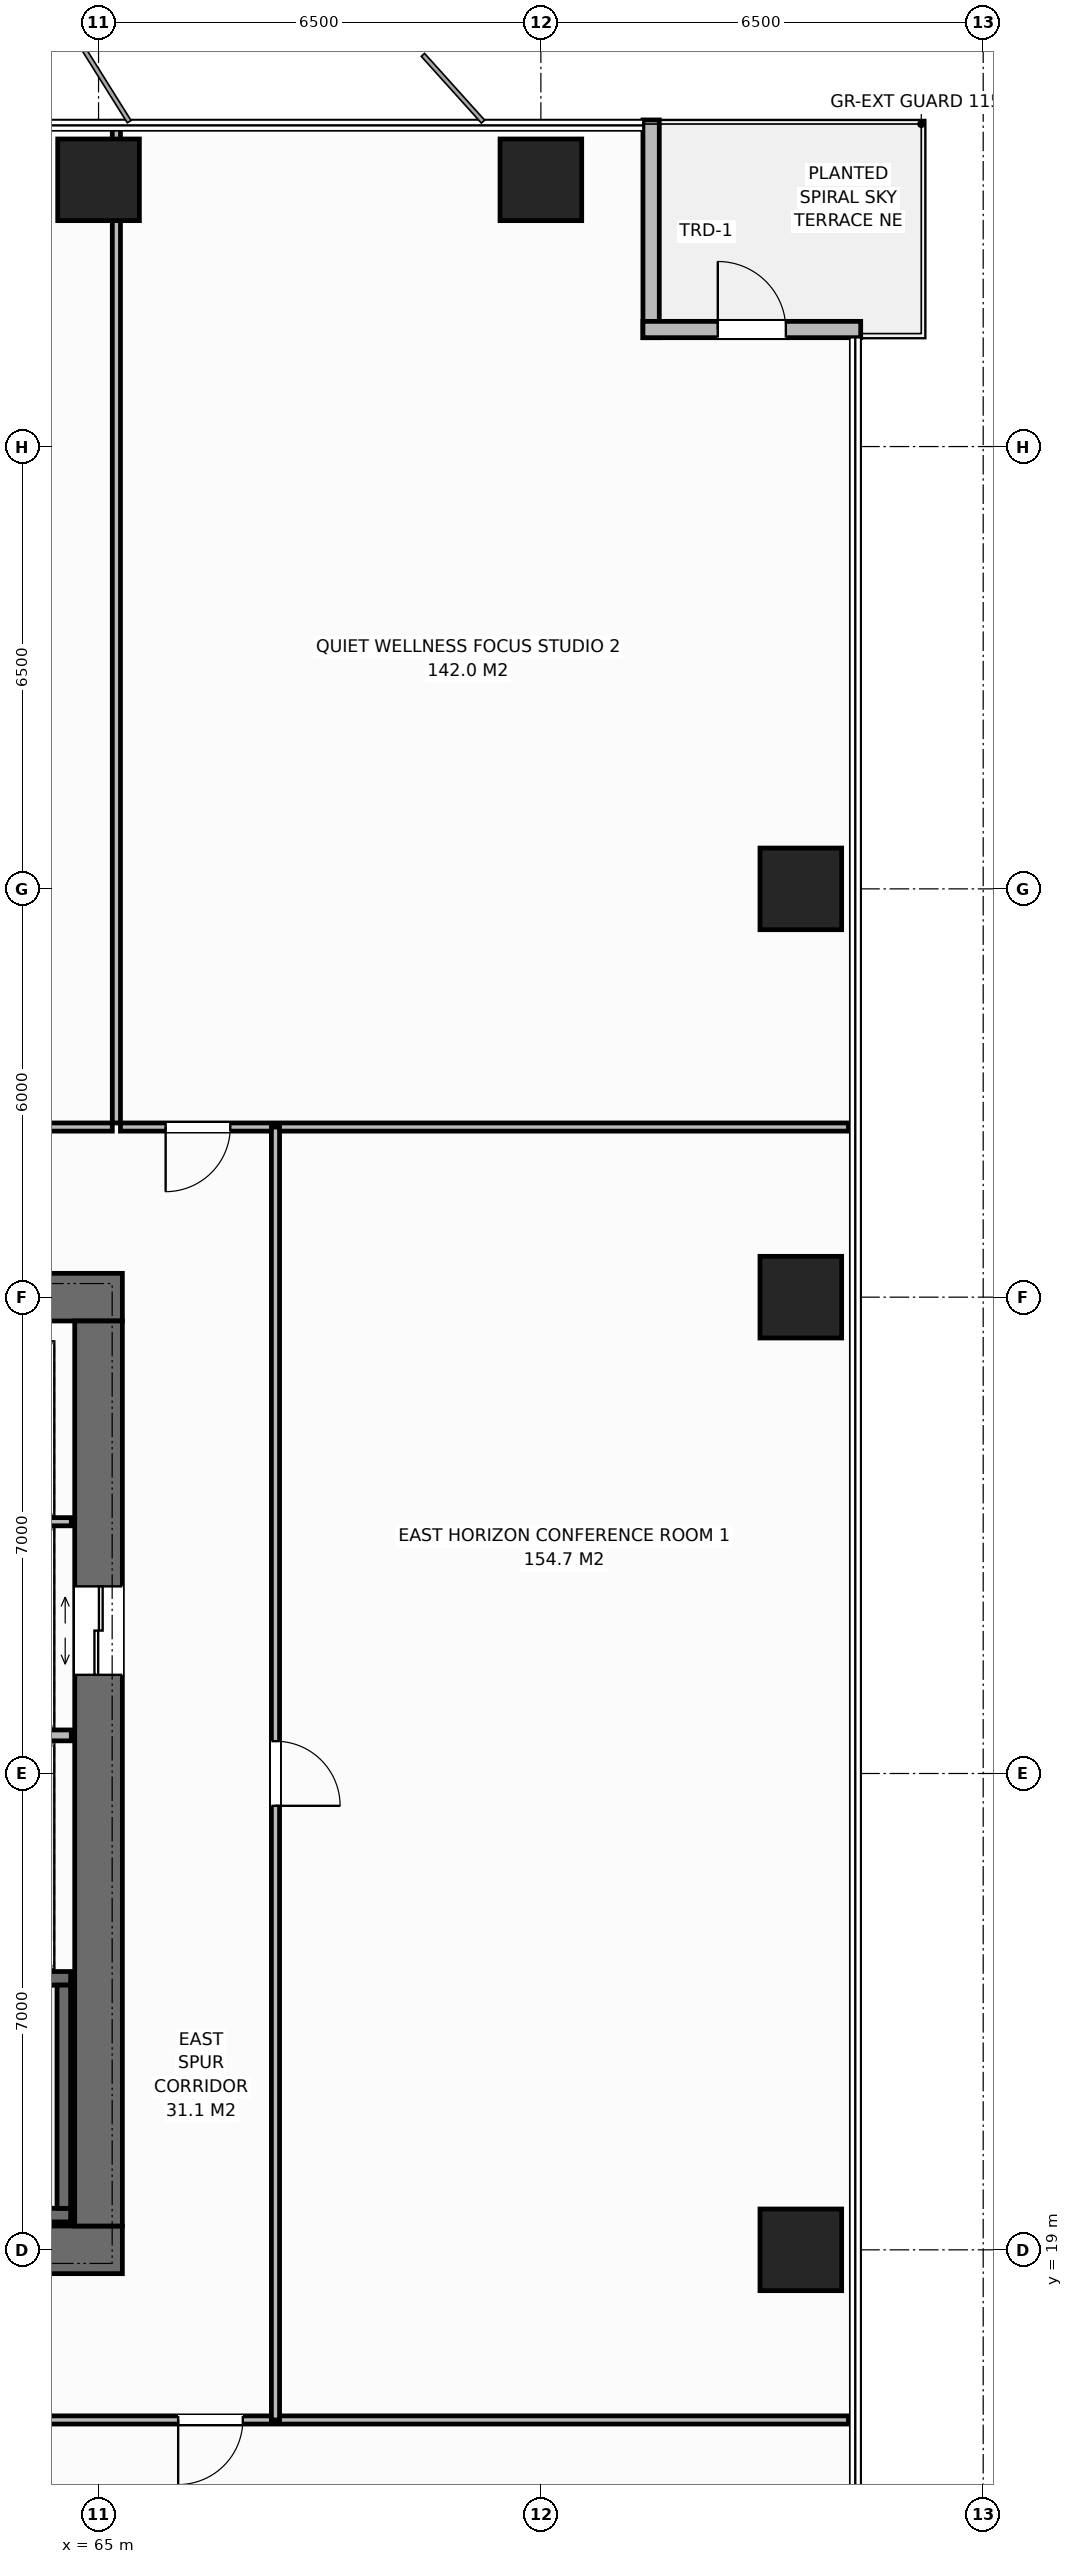
"""IFC4 building model, lengths in metres.
Left out: names, types, materials, properties, quantities, classifications, styles, units other than length and angle.
Written with IfcOpenShell. Run it as: python <this file> out.ifc"""

import sys

from ifc_helpers import new_model, si_unit, direction, frame, frame_2d, origin, origin_2d, place, context, subcontext, project, spatial, rectangle, extrude, element, fill, save


model = new_model("IFC4")
c1 = context("Model", 3, precision=1e-05, world=origin(), true_north=direction((0.0, 1.0)))
c2 = subcontext(c1, "Body", "Model", "MODEL_VIEW")
j1 = project(units=[si_unit("LENGTHUNIT", "METRE"), si_unit("PLANEANGLEUNIT", "RADIAN")], contexts=[c1])
p1 = place(None, origin())
s1 = spatial("IfcSite", under=j1, at=p1, CompositionType="ELEMENT")
p2 = place(p1, origin())
s2 = spatial("IfcBuilding", under=s1, at=p2, CompositionType="ELEMENT")
p3 = place(p2, frame((0.0, 0.0, 124.0)))
s3 = spatial("IfcBuildingStorey", under=s2, at=p3, CompositionType="ELEMENT", Elevation=124.0)
p4 = place(p3, frame((51.65, 19.0, 0.0), z_axis=(0.0, 0.0, 1.0), x_axis=(1.0, 0.0, 0.0)))
e1 = element("IfcWall", 1, at=p4, inside=s3, PredefinedType="SHEAR", context=c2, shape_type="SweptSolid", body=[
    extrude(rectangle(XDim=13.7, YDim=0.7, at=frame_2d((6.85, 0.0))), origin(), (0.0, 0.0, 1.0), 3.8),
])
p5 = place(p4, frame((3.07, 0.0, 0.0)))
e2 = element("IfcOpeningElement", 2, at=p5, cuts=e1, PredefinedType="OPENING", context=c2, shape_type="SweptSolid", body=[
    extrude(rectangle(XDim=1.4, YDim=2.2, at=frame_2d((0.7, 1.1))), frame((0.0, 0.36, 0.0), z_axis=(0.0, -1.0, 0.0), x_axis=(1.0, 0.0, 0.0)), (0.0, 0.0, 1.0), 0.72),
])
p6 = place(p3, frame((51.65, 33.0, 0.0), z_axis=(0.0, 0.0, 1.0), x_axis=(1.0, 0.0, 0.0)))
e3 = element("IfcWall", 3, at=p6, inside=s3, PredefinedType="SHEAR", context=c2, shape_type="SweptSolid", body=[
    extrude(rectangle(XDim=13.7, YDim=0.7, at=frame_2d((6.85, 0.0))), origin(), (0.0, 0.0, 1.0), 3.8),
])
p7 = place(p6, frame((3.07, 0.0, 0.0)))
e4 = element("IfcOpeningElement", 4, at=p7, cuts=e3, PredefinedType="OPENING", context=c2, shape_type="SweptSolid", body=[
    extrude(rectangle(XDim=1.4, YDim=2.2, at=frame_2d((0.7, 1.1))), frame((0.0, 0.36, 0.0), z_axis=(0.0, -1.0, 0.0), x_axis=(1.0, 0.0, 0.0)), (0.0, 0.0, 1.0), 0.72),
])
p8 = place(p6, frame((10.95, 0.0, 0.0)))
e5 = element("IfcOpeningElement", 5, at=p8, cuts=e3, PredefinedType="OPENING", context=c2, shape_type="SweptSolid", body=[
    extrude(rectangle(XDim=0.9, YDim=2.15, at=frame_2d((0.45, 1.075))), frame((0.0, 0.36, 0.0), z_axis=(0.0, -1.0, 0.0), x_axis=(1.0, 0.0, 0.0)), (0.0, 0.0, 1.0), 0.72),
])
p9 = place(p6, frame((6.35, 0.0, 0.0)))
e6 = element("IfcOpeningElement", 6, at=p9, cuts=e3, PredefinedType="OPENING", context=c2, shape_type="SweptSolid", body=[
    extrude(rectangle(XDim=0.95, YDim=2.15, at=frame_2d((0.475, 1.075))), frame((0.0, 0.36, 0.0), z_axis=(0.0, -1.0, 0.0), x_axis=(1.0, 0.0, 0.0)), (0.0, 0.0, 1.0), 0.72),
])
p10 = place(p6, frame((8.8, 0.0, 0.0)))
e7 = element("IfcOpeningElement", 7, at=p10, cuts=e3, PredefinedType="OPENING", context=c2, shape_type="SweptSolid", body=[
    extrude(rectangle(XDim=0.9, YDim=2.15, at=frame_2d((0.45, 1.075))), frame((0.0, 0.36, 0.0), z_axis=(0.0, -1.0, 0.0), x_axis=(1.0, 0.0, 0.0)), (0.0, 0.0, 1.0), 0.72),
])
p11 = place(p3, frame((65.0, 19.35, 0.0), z_axis=(0.0, 0.0, 1.0), x_axis=(0.0, 1.0, 0.0)))
e8 = element("IfcWall", 8, at=p11, inside=s3, PredefinedType="SHEAR", context=c2, shape_type="SweptSolid", body=[
    extrude(rectangle(XDim=13.3, YDim=0.7, at=frame_2d((6.65, 0.0))), origin(), (0.0, 0.0, 1.0), 3.8),
])
p12 = place(p11, frame((8.1, 0.0, 0.0)))
e9 = element("IfcOpeningElement", 9, at=p12, cuts=e8, PredefinedType="OPENING", context=c2, shape_type="SweptSolid", body=[
    extrude(rectangle(XDim=1.3, YDim=2.2, at=frame_2d((0.65, 1.1))), frame((0.0, 0.36, 0.0), z_axis=(0.0, -1.0, 0.0), x_axis=(1.0, 0.0, 0.0)), (0.0, 0.0, 1.0), 0.72),
])
p13 = place(p3, frame((56.16, 19.51, 0.0), z_axis=(0.0, 0.0, 1.0), x_axis=(1.0, 0.0, 0.0)))
e10 = element("IfcWall", 10, at=p13, inside=s3, PredefinedType="SHEAR", context=c2, shape_type="SweptSolid", body=[
    extrude(rectangle(XDim=8.43, YDim=0.2, at=frame_2d((4.215, 0.0))), origin(), (0.0, 0.0, 1.0), 3.8),
])
p14 = place(p3, frame((56.16, 22.99, 0.0), z_axis=(0.0, 0.0, 1.0), x_axis=(1.0, 0.0, 0.0)))
e11 = element("IfcWall", 11, at=p14, inside=s3, PredefinedType="SHEAR", context=c2, shape_type="SweptSolid", body=[
    extrude(rectangle(XDim=8.43, YDim=0.2, at=frame_2d((4.215, 0.0))), origin(), (0.0, 0.0, 1.0), 3.8),
])
p15 = place(p14, frame((0.45, 0.0, 0.0)))
e12 = element("IfcOpeningElement", 12, at=p15, cuts=e11, PredefinedType="OPENING", context=c2, shape_type="SweptSolid", body=[
    extrude(rectangle(XDim=1.0, YDim=2.15, at=frame_2d((0.5, 1.075))), frame((0.0, 0.11, 0.0), z_axis=(0.0, -1.0, 0.0), x_axis=(1.0, 0.0, 0.0)), (0.0, 0.0, 1.0), 0.22),
])
p16 = place(p3, frame((64.49, 19.61, 0.0), z_axis=(0.0, 0.0, 1.0), x_axis=(0.0, 1.0, 0.0)))
e13 = element("IfcWall", 13, at=p16, inside=s3, PredefinedType="SHEAR", context=c2, shape_type="SweptSolid", body=[
    extrude(rectangle(XDim=3.28, YDim=0.2, at=frame_2d((1.64, 0.0))), origin(), (0.0, 0.0, 1.0), 3.8),
])
for number, where, z_axis, x_axis in (
    (14, (65.0, 49.42, 0.0), (0.0, 0.0, 1.0), (1.0, 0.0, 0.0)),
    (15, (71.5, 49.42, 0.0), (0.0, 0.0, 1.0), (1.0, 0.0, 0.0)),
    (16, (75.32, 19.0, 0.0), (0.0, 0.0, 1.0), (1.0, 0.0, 0.0)),
    (17, (75.32, 33.0, 0.0), (0.0, 0.0, 1.0), (1.0, 0.0, 0.0)),
    (18, (75.32, 39.0, 0.0), (0.0, 0.0, 1.0), (1.0, 0.0, 0.0)),
):
    element("IfcColumn", number, at=place(p3, frame(where, z_axis=z_axis, x_axis=x_axis)), inside=s3, PredefinedType="COLUMN", context=c2, shape_type="SweptSolid", body=[
        extrude(rectangle(XDim=1.2, YDim=1.2, at=origin_2d()), origin(), (0.0, 0.0, 1.0), 3.8),
    ])
p17 = place(p3, frame((73.12, 50.3, 0.0), z_axis=(0.0, 0.0, 1.0), x_axis=(0.0, -1.0, 0.0)))
e19 = element("IfcWall", 19, at=p17, inside=s3, PredefinedType="STANDARD", context=c2, shape_type="SweptSolid", body=[
    extrude(rectangle(XDim=3.2, YDim=0.24, at=frame_2d((1.6, 0.0))), origin(), (0.0, 0.0, 1.0), 3.565),
])
p18 = place(p3, frame((73.0, 47.22, 0.0), z_axis=(0.0, 0.0, 1.0), x_axis=(1.0, 0.0, 0.0)))
e20 = element("IfcWall", 20, at=p18, inside=s3, PredefinedType="STANDARD", context=c2, shape_type="SweptSolid", body=[
    extrude(rectangle(XDim=3.2, YDim=0.24, at=frame_2d((1.6, 0.0))), origin(), (0.0, 0.0, 1.0), 3.565),
])
p19 = place(p18, frame((1.1, 0.0, 0.0)))
e21 = element("IfcOpeningElement", 21, at=p19, cuts=e20, PredefinedType="OPENING", context=c2, shape_type="SweptSolid", body=[
    extrude(rectangle(XDim=1.0, YDim=2.2, at=frame_2d((0.5, 1.1))), frame((0.0, 0.13, 0.0), z_axis=(0.0, -1.0, 0.0), x_axis=(1.0, 0.0, 0.0)), (0.0, 0.0, 1.0), 0.26),
])
p20 = place(p3, frame((56.26, 26.56, 0.0), z_axis=(0.0, 0.0, 1.0), x_axis=(1.0, 0.0, 0.0)))
e22 = element("IfcWall", 22, at=p20, inside=s3, PredefinedType="STANDARD", context=c2, shape_type="SweptSolid", body=[
    extrude(rectangle(XDim=8.34, YDim=0.16, at=frame_2d((4.17, 0.0))), origin(), (0.0, 0.0, 1.0), 3.565),
])
p21 = place(p3, frame((61.87, 29.7, 0.0), z_axis=(0.0, 0.0, 1.0), x_axis=(1.0, 0.0, 0.0)))
e23 = element("IfcWall", 23, at=p21, inside=s3, PredefinedType="PARTITIONING", context=c2, shape_type="SweptSolid", body=[
    extrude(rectangle(XDim=2.73, YDim=0.12, at=frame_2d((1.365, 0.0))), origin(), (0.0, 0.0, 1.0), 3.565),
])
p22 = place(p3, frame((65.262, 35.56, 0.0), z_axis=(0.0, 0.0, 1.0), x_axis=(0.0, 1.0, 0.0)))
e24 = element("IfcWall", 24, at=p22, inside=s3, PredefinedType="PARTITIONING", context=c2, shape_type="SweptSolid", body=[
    extrude(rectangle(XDim=14.72, YDim=0.12, at=frame_2d((7.36, 0.0))), origin(), (0.0, 0.0, 1.0), 3.565),
])
p23 = place(p3, frame((58.881, 35.5, 0.0), z_axis=(0.0, 0.0, 1.0), x_axis=(1.0, 0.0, 0.0)))
e25 = element("IfcWall", 25, at=p23, inside=s3, PredefinedType="PARTITIONING", context=c2, shape_type="SweptSolid", body=[
    extrude(rectangle(XDim=6.321, YDim=0.12, at=frame_2d((3.161, 0.0))), origin(), (0.0, 0.0, 1.0), 3.565),
])
p24 = place(p23, frame((2.686, 0.0, 0.0)))
e26 = element("IfcOpeningElement", 26, at=p24, cuts=e25, PredefinedType="OPENING", context=c2, shape_type="SweptSolid", body=[
    extrude(rectangle(XDim=0.95, YDim=2.15, at=frame_2d((0.475, 1.075))), frame((0.0, 0.07, 0.0), z_axis=(0.0, -1.0, 0.0), x_axis=(1.0, 0.0, 0.0)), (0.0, 0.0, 1.0), 0.14),
])
p25 = place(p3, frame((65.322, 35.5, 0.0), z_axis=(0.0, 0.0, 1.0), x_axis=(1.0, 0.0, 0.0)))
e27 = element("IfcWall", 27, at=p25, inside=s3, PredefinedType="PARTITIONING", context=c2, shape_type="SweptSolid", body=[
    extrude(rectangle(XDim=10.698, YDim=0.12, at=frame_2d((5.349, 0.0))), origin(), (0.0, 0.0, 1.0), 3.565),
])
p26 = place(p25, frame((0.664, 0.0, 0.0)))
e28 = element("IfcOpeningElement", 28, at=p26, cuts=e27, PredefinedType="OPENING", context=c2, shape_type="SweptSolid", body=[
    extrude(rectangle(XDim=0.95, YDim=2.15, at=frame_2d((0.475, 1.075))), frame((0.0, 0.07, 0.0), z_axis=(0.0, -1.0, 0.0), x_axis=(1.0, 0.0, 0.0)), (0.0, 0.0, 1.0), 0.14),
])
p27 = place(p3, frame((63.955, 16.5, 0.0), z_axis=(0.0, 0.0, 1.0), x_axis=(1.0, 0.0, 0.0)))
e29 = element("IfcWall", 29, at=p27, inside=s3, PredefinedType="PARTITIONING", context=c2, shape_type="SweptSolid", body=[
    extrude(rectangle(XDim=12.065, YDim=0.12, at=frame_2d((6.033, 0.0))), origin(), (0.0, 0.0, 1.0), 3.565),
])
p28 = place(p27, frame((2.215, 0.0, 0.0)))
e30 = element("IfcOpeningElement", 30, at=p28, cuts=e29, PredefinedType="OPENING", context=c2, shape_type="SweptSolid", body=[
    extrude(rectangle(XDim=0.95, YDim=2.15, at=frame_2d((0.475, 1.075))), frame((0.0, 0.07, 0.0), z_axis=(0.0, -1.0, 0.0), x_axis=(1.0, 0.0, 0.0)), (0.0, 0.0, 1.0), 0.14),
])
p29 = place(p3, frame((67.6, 16.5, 0.0), z_axis=(0.0, 0.0, 1.0), x_axis=(0.0, 1.0, 0.0)))
e31 = element("IfcWall", 31, at=p29, inside=s3, PredefinedType="PARTITIONING", context=c2, shape_type="SweptSolid", body=[
    extrude(rectangle(XDim=19.0, YDim=0.12, at=frame_2d((9.5, 0.0))), origin(), (0.0, 0.0, 1.0), 3.565),
])
p30 = place(p29, frame((9.025, 0.0, 0.0)))
e32 = element("IfcOpeningElement", 32, at=p30, cuts=e31, PredefinedType="OPENING", context=c2, shape_type="SweptSolid", body=[
    extrude(rectangle(XDim=0.95, YDim=2.15, at=frame_2d((0.475, 1.075))), frame((0.0, 0.07, 0.0), z_axis=(0.0, -1.0, 0.0), x_axis=(1.0, 0.0, 0.0)), (0.0, 0.0, 1.0), 0.14),
])
p31 = place(p19, origin())
e33 = element("IfcDoor", 33, at=p31, inside=s3, OperationType="SINGLE_SWING_LEFT", PredefinedType="DOOR", context=c2, shape_type="SweptSolid", body=[
    extrude(rectangle(XDim=1.0, YDim=2.2, at=frame_2d((0.5, 1.1))), frame((0.0, 0.025, 0.0), z_axis=(0.0, -1.0, 0.0), x_axis=(1.0, 0.0, 0.0)), (0.0, 0.0, 1.0), 0.05),
])
fill(e21, e33)
p32 = place(p12, origin())
e34 = element("IfcDoor", 34, at=p32, inside=s3, OperationType="DOUBLE_DOOR_SLIDING", PredefinedType="DOOR", context=c2, shape_type="SweptSolid", body=[
    extrude(rectangle(XDim=1.3, YDim=2.2, at=frame_2d((0.65, 1.1))), frame((0.0, 0.025, 0.0), z_axis=(0.0, -1.0, 0.0), x_axis=(1.0, 0.0, 0.0)), (0.0, 0.0, 1.0), 0.05),
])
fill(e9, e34)
p33 = place(p26, origin())
e35 = element("IfcDoor", 35, at=p33, inside=s3, OperationType="SINGLE_SWING_RIGHT", PredefinedType="DOOR", context=c2, shape_type="SweptSolid", body=[
    extrude(rectangle(XDim=0.95, YDim=2.15, at=frame_2d((0.475, 1.075))), frame((0.0, 0.025, 0.0), z_axis=(0.0, -1.0, 0.0), x_axis=(1.0, 0.0, 0.0)), (0.0, 0.0, 1.0), 0.05),
])
fill(e28, e35)
p34 = place(p28, origin())
e36 = element("IfcDoor", 36, at=p34, inside=s3, OperationType="SINGLE_SWING_RIGHT", PredefinedType="DOOR", context=c2, shape_type="SweptSolid", body=[
    extrude(rectangle(XDim=0.95, YDim=2.15, at=frame_2d((0.475, 1.075))), frame((0.0, 0.025, 0.0), z_axis=(0.0, -1.0, 0.0), x_axis=(1.0, 0.0, 0.0)), (0.0, 0.0, 1.0), 0.05),
])
fill(e30, e36)
p35 = place(p30, origin())
e37 = element("IfcDoor", 37, at=p35, inside=s3, OperationType="SINGLE_SWING_RIGHT", PredefinedType="DOOR", context=c2, shape_type="SweptSolid", body=[
    extrude(rectangle(XDim=0.95, YDim=2.15, at=frame_2d((0.475, 1.075))), frame((0.0, 0.025, 0.0), z_axis=(0.0, -1.0, 0.0), x_axis=(1.0, 0.0, 0.0)), (0.0, 0.0, 1.0), 0.05),
])
fill(e32, e37)
save(model, sys.argv[1])
